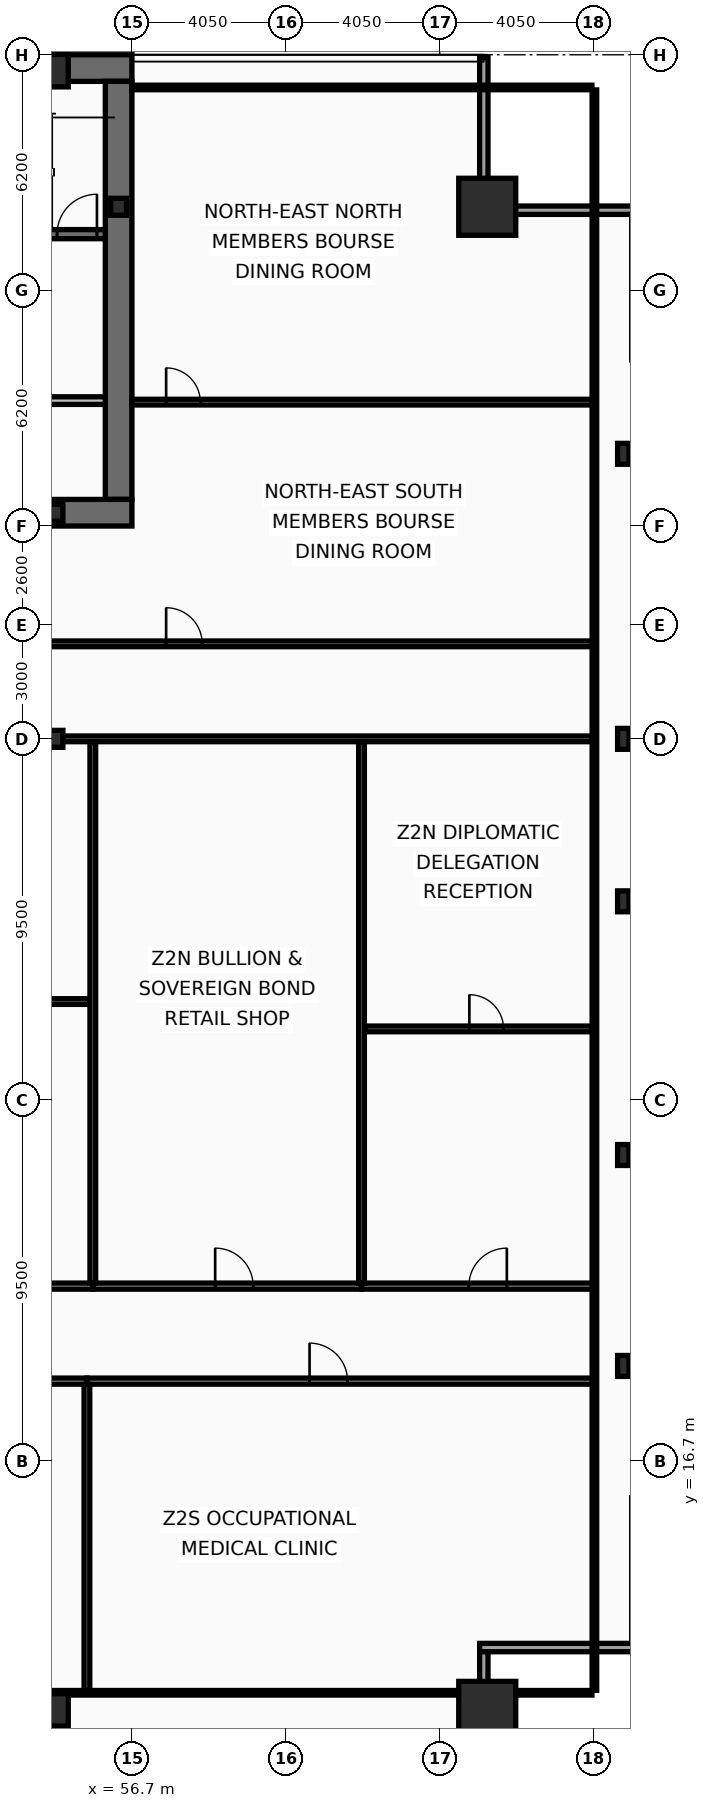
"""IFC4 building model, lengths in metres.
Left out: names, types, materials, properties, quantities, classifications, styles, units other than length and angle.
Written with IfcOpenShell. Run it as: python <this file> out.ifc"""

import sys

from ifc_helpers import new_model, si_unit, direction, frame, frame_2d, origin, origin_2d, place, context, subcontext, project, spatial, rectangle, hollow_rectangle, i_section, extrude, element, fill, save


model = new_model("IFC4")
c1 = context("Model", 3, precision=1e-05, world=origin(), true_north=direction((0.0, 1.0)))
c2 = subcontext(c1, "Body", "Model", "MODEL_VIEW")
j1 = project(units=[si_unit("LENGTHUNIT", "METRE"), si_unit("PLANEANGLEUNIT", "RADIAN")], contexts=[c1])
p1 = place(None, origin())
s1 = spatial("IfcSite", under=j1, at=p1, CompositionType="ELEMENT")
p2 = place(p1, origin())
s2 = spatial("IfcBuilding", under=s1, at=p2, CompositionType="ELEMENT")
p3 = place(p2, frame((0.0, 0.0, 114.6)))
s3 = spatial("IfcBuildingStorey", under=s2, at=p3, CompositionType="ELEMENT", Elevation=114.6)
p4 = place(p3, frame((16.2, 53.35, 0.0), z_axis=(0.0, 0.0, 1.0), x_axis=(1.0, 0.0, 0.0)))
e1 = element("IfcWall", 1, at=p4, inside=s3, PredefinedType="SHEAR", context=c2, shape_type="SweptSolid", body=[
    extrude(rectangle(XDim=40.5, YDim=0.7, at=frame_2d((20.25, 0.0))), origin(), (0.0, 0.0, 1.0), 3.44),
])
p5 = place(p3, frame((56.35, 53.0, 0.0), z_axis=(0.0, 0.0, 1.0), x_axis=(0.0, -1.0, 0.0)))
e2 = element("IfcWall", 2, at=p5, inside=s3, PredefinedType="SHEAR", context=c2, shape_type="SweptSolid", body=[
    extrude(rectangle(XDim=11.0, YDim=0.7, at=frame_2d((5.5, 0.0))), origin(), (0.0, 0.0, 1.0), 3.44),
])
p6 = place(p3, frame((56.7, 41.65, 0.0), z_axis=(0.0, 0.0, 1.0), x_axis=(-1.0, 0.0, 0.0)))
e3 = element("IfcWall", 3, at=p6, inside=s3, PredefinedType="SHEAR", context=c2, shape_type="SweptSolid", body=[
    extrude(rectangle(XDim=2.45, YDim=0.7, at=frame_2d((1.225, 0.0))), origin(), (0.0, 0.0, 1.0), 3.44),
])
p7 = place(p3, frame((48.63, 48.98, 0.0), z_axis=(0.0, 0.0, 1.0), x_axis=(1.0, 0.0, 0.0)))
e4 = element("IfcWall", 4, at=p7, inside=s3, PredefinedType="SHEAR", context=c2, shape_type="SweptSolid", body=[
    extrude(rectangle(XDim=7.37, YDim=0.24, at=frame_2d((3.685, 0.0))), origin(), (0.0, 0.0, 1.0), 3.44),
])
p8 = place(p7, frame((6.1, 0.0, 0.0)))
e5 = element("IfcOpeningElement", 5, at=p8, cuts=e4, PredefinedType="OPENING", context=c2, shape_type="SweptSolid", body=[
    extrude(rectangle(XDim=1.05, YDim=2.15, at=frame_2d((0.525, 1.075))), frame((0.0, 0.13, 0.0), z_axis=(0.0, -1.0, 0.0), x_axis=(1.0, 0.0, 0.0)), (0.0, 0.0, 1.0), 0.26),
])
for number, where, z_axis, x_axis in (
    (6, (66.05, 10.15, 0.0), (0.0, 0.0, 1.0), (1.0, 0.0, 0.0)),
    (7, (66.05, 49.7, 0.0), (0.0, 0.0, 1.0), (1.0, 0.0, 0.0)),
):
    element("IfcColumn", number, at=place(p3, frame(where, z_axis=z_axis, x_axis=x_axis)), inside=s3, PredefinedType="COLUMN", context=c2, shape_type="SweptSolid", body=[
        extrude(hollow_rectangle(XDim=1.5, YDim=1.5, WallThickness=0.07, at=origin_2d()), origin(), (0.0, 0.0, 1.0), 3.6),
    ])
for number, where, z_axis, x_axis in (
    (8, (54.675, 10.15, 0.0), (0.0, 0.0, 1.0), (1.0, 0.0, 0.0)),
    (9, (54.675, 53.28, 0.0), (0.0, 0.0, 1.0), (1.0, 0.0, 0.0)),
):
    element("IfcColumn", number, at=place(p3, frame(where, z_axis=z_axis, x_axis=x_axis)), inside=s3, PredefinedType="COLUMN", context=c2, shape_type="SweptSolid", body=[
        extrude(hollow_rectangle(XDim=0.7, YDim=0.85, WallThickness=0.05, at=origin_2d()), origin(), (0.0, 0.0, 1.0), 3.6),
    ])
for number, where, z_axis, x_axis in (
    (10, (69.63, 19.2, 0.0), (0.0, 0.0, 1.0), (1.0, 0.0, 0.0)),
    (11, (69.63, 24.75, 0.0), (0.0, 0.0, 1.0), (1.0, 0.0, 0.0)),
    (12, (69.63, 31.425, 0.0), (0.0, 0.0, 1.0), (1.0, 0.0, 0.0)),
    (13, (69.63, 35.7, 0.0), (0.0, 0.0, 1.0), (1.0, 0.0, 0.0)),
    (14, (69.63, 43.2, 0.0), (0.0, 0.0, 1.0), (1.0, 0.0, 0.0)),
):
    element("IfcColumn", number, at=place(p3, frame(where, z_axis=z_axis, x_axis=x_axis)), inside=s3, PredefinedType="COLUMN", context=c2, shape_type="SweptSolid", body=[
        extrude(i_section(OverallWidth=0.3, OverallDepth=0.55, WebThickness=0.015, FlangeThickness=0.029, at=origin_2d()), origin(), (0.0, 0.0, 1.0), 3.6),
    ])
for number, where, z_axis, x_axis in (
    (15, (56.35, 49.7, 0.0), (0.0, 0.0, 1.0), (1.0, 0.0, 0.0)),
    (16, (54.675, 35.7, 0.0), (0.0, 0.0, 1.0), (1.0, 0.0, 0.0)),
    (17, (54.675, 41.65, 0.0), (0.0, 0.0, 1.0), (1.0, 0.0, 0.0)),
):
    element("IfcColumn", number, at=place(p3, frame(where, z_axis=z_axis, x_axis=x_axis)), inside=s3, PredefinedType="COLUMN", context=c2, shape_type="SweptSolid", body=[
        extrude(i_section(OverallWidth=0.416, OverallDepth=0.446, WebThickness=0.039, FlangeThickness=0.063, at=origin_2d()), origin(), (0.0, 0.0, 1.0), 3.6),
    ])
p9 = place(p3, frame((65.96, 53.63, 0.0), z_axis=(0.0, 0.0, 1.0), x_axis=(0.0, -1.0, 0.0)))
e18 = element("IfcWall", 18, at=p9, inside=s3, PredefinedType="SOLIDWALL", context=c2, shape_type="SweptSolid", body=[
    extrude(rectangle(XDim=3.91, YDim=0.22, at=frame_2d((1.955, 0.0))), origin(), (0.0, 0.0, 1.0), 2.83),
])
for number, where, z_axis, x_axis in (
    (19, (65.85, 49.61, 0.0), (0.0, 0.0, 1.0), (1.0, 0.0, 0.0)),
    (20, (70.07, 11.79, 0.0), (0.0, 0.0, 1.0), (-1.0, 0.0, 0.0)),
):
    element("IfcWall", number, at=place(p3, frame(where, z_axis=z_axis, x_axis=x_axis)), inside=s3, PredefinedType="SOLIDWALL", context=c2, shape_type="SweptSolid", body=[
        extrude(rectangle(XDim=4.22, YDim=0.22, at=frame_2d((2.11, 0.0))), origin(), (0.0, 0.0, 1.0), 2.83),
    ])
p10 = place(p3, frame((65.96, 11.68, 0.0), z_axis=(0.0, 0.0, 1.0), x_axis=(0.0, -1.0, 0.0)))
e21 = element("IfcWall", 21, at=p10, inside=s3, PredefinedType="SOLIDWALL", context=c2, shape_type="SweptSolid", body=[
    extrude(rectangle(XDim=3.91, YDim=0.22, at=frame_2d((1.955, 0.0))), origin(), (0.0, 0.0, 1.0), 2.83),
])
p11 = place(p3, frame((51.9, 44.6, 0.0), z_axis=(0.0, 0.0, 1.0), x_axis=(1.0, 0.0, 0.0)))
e22 = element("IfcWall", 22, at=p11, inside=s3, PredefinedType="PARTITIONING", context=c2, shape_type="SweptSolid", body=[
    extrude(rectangle(XDim=4.1, YDim=0.2, at=frame_2d((2.05, 0.0))), origin(), (0.0, 0.0, 1.0), 3.44),
])
p12 = place(p11, frame((1.15, 0.0, 0.0)))
e23 = element("IfcOpeningElement", 23, at=p12, cuts=e22, PredefinedType="OPENING", context=c2, shape_type="SweptSolid", body=[
    extrude(rectangle(XDim=1.05, YDim=2.15, at=frame_2d((0.525, 1.075))), frame((0.0, 0.11, 0.0), z_axis=(0.0, -1.0, 0.0), x_axis=(1.0, 0.0, 0.0)), (0.0, 0.0, 1.0), 0.22),
])
p13 = place(p3, frame((54.35, 38.2, 0.0), z_axis=(0.0, 0.0, 1.0), x_axis=(1.0, 0.0, 0.0)))
e24 = element("IfcWall", 24, at=p13, inside=s3, PredefinedType="PARTITIONING", context=c2, shape_type="SweptSolid", body=[
    extrude(rectangle(XDim=14.52, YDim=0.15, at=frame_2d((7.26, 0.0))), origin(), (0.0, 0.0, 1.0), 2.73),
])
p14 = place(p13, frame((3.25, 0.0, 0.0)))
e25 = element("IfcOpeningElement", 25, at=p14, cuts=e24, PredefinedType="OPENING", context=c2, shape_type="SweptSolid", body=[
    extrude(rectangle(XDim=0.95, YDim=2.05, at=frame_2d((0.475, 1.025))), frame((0.0, 0.085, 0.0), z_axis=(0.0, -1.0, 0.0), x_axis=(1.0, 0.0, 0.0)), (0.0, 0.0, 1.0), 0.17),
])
p15 = place(p3, frame((56.7, 44.56, 0.0), z_axis=(0.0, 0.0, 1.0), x_axis=(1.0, 0.0, 0.0)))
e26 = element("IfcWall", 26, at=p15, inside=s3, PredefinedType="PARTITIONING", context=c2, shape_type="SweptSolid", body=[
    extrude(rectangle(XDim=12.105, YDim=0.15, at=frame_2d((6.052, 0.0))), origin(), (0.0, 0.0, 1.0), 2.83),
])
p16 = place(p15, frame((0.9, 0.0, 0.0)))
e27 = element("IfcOpeningElement", 27, at=p16, cuts=e26, PredefinedType="OPENING", context=c2, shape_type="SweptSolid", body=[
    extrude(rectangle(XDim=0.9, YDim=2.05, at=frame_2d((0.45, 1.025))), frame((0.0, 0.085, 0.0), z_axis=(0.0, -1.0, 0.0), x_axis=(1.0, 0.0, 0.0)), (0.0, 0.0, 1.0), 0.17),
])
p17 = place(p3, frame((42.136, 18.8, 0.0), z_axis=(0.0, 0.0, 1.0), x_axis=(1.0, 0.0, 0.0)))
e28 = element("IfcWall", 28, at=p17, inside=s3, PredefinedType="PARTITIONING", context=c2, shape_type="SweptSolid", body=[
    extrude(rectangle(XDim=13.38, YDim=0.16, at=frame_2d((6.69, 0.0))), origin(), (0.0, 0.0, 1.0), 2.73),
])
p18 = place(p17, frame((5.87, 0.0, 0.0)))
e29 = element("IfcOpeningElement", 29, at=p18, cuts=e28, PredefinedType="OPENING", context=c2, shape_type="SweptSolid", body=[
    extrude(rectangle(XDim=1.0, YDim=2.05, at=frame_2d((0.5, 1.025))), frame((0.0, 0.09, 0.0), z_axis=(0.0, -1.0, 0.0), x_axis=(1.0, 0.0, 0.0)), (0.0, 0.0, 1.0), 0.18),
])
p19 = place(p3, frame((55.516, 18.8, 0.0), z_axis=(0.0, 0.0, 1.0), x_axis=(1.0, 0.0, 0.0)))
e30 = element("IfcWall", 30, at=p19, inside=s3, PredefinedType="PARTITIONING", context=c2, shape_type="SweptSolid", body=[
    extrude(rectangle(XDim=13.354, YDim=0.16, at=frame_2d((6.677, 0.0))), origin(), (0.0, 0.0, 1.0), 2.73),
])
p20 = place(p19, frame((5.859, 0.0, 0.0)))
e31 = element("IfcOpeningElement", 31, at=p20, cuts=e30, PredefinedType="OPENING", context=c2, shape_type="SweptSolid", body=[
    extrude(rectangle(XDim=1.0, YDim=2.05, at=frame_2d((0.5, 1.025))), frame((0.0, 0.09, 0.0), z_axis=(0.0, -1.0, 0.0), x_axis=(1.0, 0.0, 0.0)), (0.0, 0.0, 1.0), 0.18),
])
p21 = place(p3, frame((55.516, 10.665, 0.0), z_axis=(0.0, 0.0, 1.0), x_axis=(0.0, 1.0, 0.0)))
e32 = element("IfcWall", 32, at=p21, inside=s3, PredefinedType="PARTITIONING", context=c2, shape_type="SweptSolid", body=[
    extrude(rectangle(XDim=8.05, YDim=0.15, at=frame_2d((4.025, 0.0))), origin(), (0.0, 0.0, 1.0), 3.44),
])
p22 = place(p3, frame((21.81, 35.7, 0.0), z_axis=(0.0, 0.0, 1.0), x_axis=(1.0, 0.0, 0.0)))
e33 = element("IfcWall", 33, at=p22, inside=s3, PredefinedType="PARTITIONING", context=c2, shape_type="SweptSolid", body=[
    extrude(rectangle(XDim=46.995, YDim=0.15, at=frame_2d((23.498, 0.0))), origin(), (0.0, 0.0, 1.0), 2.73),
])
p23 = place(p3, frame((49.071, 21.3, 0.0), z_axis=(0.0, 0.0, 1.0), x_axis=(1.0, 0.0, 0.0)))
e34 = element("IfcWall", 34, at=p23, inside=s3, PredefinedType="PARTITIONING", context=c2, shape_type="SweptSolid", body=[
    extrude(rectangle(XDim=6.6, YDim=0.16, at=frame_2d((3.3, 0.0))), origin(), (0.0, 0.0, 1.0), 2.73),
])
p24 = place(p23, frame((3.022, 0.0, 0.0)))
e35 = element("IfcOpeningElement", 35, at=p24, cuts=e34, PredefinedType="OPENING", context=c2, shape_type="SweptSolid", body=[
    extrude(rectangle(XDim=1.0, YDim=2.05, at=frame_2d((0.5, 1.025))), frame((0.0, 0.09, 0.0), z_axis=(0.0, -1.0, 0.0), x_axis=(1.0, 0.0, 0.0)), (0.0, 0.0, 1.0), 0.18),
])
p25 = place(p3, frame((49.151, 28.788, 0.0), z_axis=(0.0, 0.0, 1.0), x_axis=(1.0, 0.0, 0.0)))
e36 = element("IfcWall", 36, at=p25, inside=s3, PredefinedType="PARTITIONING", context=c2, shape_type="SweptSolid", body=[
    extrude(rectangle(XDim=6.44, YDim=0.15, at=frame_2d((3.22, 0.0))), origin(), (0.0, 0.0, 1.0), 2.73),
])
p26 = place(p25, frame((2.97, 0.0, 0.0)))
e37 = element("IfcOpeningElement", 37, at=p26, cuts=e36, PredefinedType="OPENING", context=c2, shape_type="SweptSolid", body=[
    extrude(rectangle(XDim=0.9, YDim=2.05, at=frame_2d((0.45, 1.025))), frame((0.0, 0.085, 0.0), z_axis=(0.0, -1.0, 0.0), x_axis=(1.0, 0.0, 0.0)), (0.0, 0.0, 1.0), 0.17),
])
p27 = place(p3, frame((55.671, 21.3, 0.0), z_axis=(0.0, 0.0, 1.0), x_axis=(1.0, 0.0, 0.0)))
e38 = element("IfcWall", 38, at=p27, inside=s3, PredefinedType="PARTITIONING", context=c2, shape_type="SweptSolid", body=[
    extrude(rectangle(XDim=7.071, YDim=0.16, at=frame_2d((3.535, 0.0))), origin(), (0.0, 0.0, 1.0), 3.44),
])
p28 = place(p27, frame((3.22, 0.0, 0.0)))
e39 = element("IfcOpeningElement", 39, at=p28, cuts=e38, PredefinedType="OPENING", context=c2, shape_type="SweptSolid", body=[
    extrude(rectangle(XDim=1.0, YDim=2.05, at=frame_2d((0.5, 1.025))), frame((0.0, 0.09, 0.0), z_axis=(0.0, -1.0, 0.0), x_axis=(1.0, 0.0, 0.0)), (0.0, 0.0, 1.0), 0.18),
])
p29 = place(p3, frame((55.671, 21.385, 0.0), z_axis=(0.0, 0.0, 1.0), x_axis=(0.0, 1.0, 0.0)))
e40 = element("IfcWall", 40, at=p29, inside=s3, PredefinedType="PARTITIONING", context=c2, shape_type="SweptSolid", body=[
    extrude(rectangle(XDim=14.235, YDim=0.15, at=frame_2d((7.118, 0.0))), origin(), (0.0, 0.0, 1.0), 2.73),
])
p30 = place(p3, frame((62.742, 21.3, 0.0), z_axis=(0.0, 0.0, 1.0), x_axis=(1.0, 0.0, 0.0)))
e41 = element("IfcWall", 41, at=p30, inside=s3, PredefinedType="PARTITIONING", context=c2, shape_type="SweptSolid", body=[
    extrude(rectangle(XDim=6.128, YDim=0.16, at=frame_2d((3.064, 0.0))), origin(), (0.0, 0.0, 1.0), 3.44),
])
p31 = place(p30, frame((2.824, 0.0, 0.0)))
e42 = element("IfcOpeningElement", 42, at=p31, cuts=e41, PredefinedType="OPENING", context=c2, shape_type="SweptSolid", body=[
    extrude(rectangle(XDim=1.0, YDim=2.05, at=frame_2d((0.5, 1.025))), frame((0.0, 0.09, 0.0), z_axis=(0.0, -1.0, 0.0), x_axis=(1.0, 0.0, 0.0)), (0.0, 0.0, 1.0), 0.18),
])
p32 = place(p3, frame((62.742, 21.385, 0.0), z_axis=(0.0, 0.0, 1.0), x_axis=(0.0, 1.0, 0.0)))
e43 = element("IfcWall", 43, at=p32, inside=s3, PredefinedType="PARTITIONING", context=c2, shape_type="SweptSolid", body=[
    extrude(rectangle(XDim=14.235, YDim=0.15, at=frame_2d((7.118, 0.0))), origin(), (0.0, 0.0, 1.0), 2.73),
])
p33 = place(p3, frame((62.822, 28.068, 0.0), z_axis=(0.0, 0.0, 1.0), x_axis=(1.0, 0.0, 0.0)))
e44 = element("IfcWall", 44, at=p33, inside=s3, PredefinedType="PARTITIONING", context=c2, shape_type="SweptSolid", body=[
    extrude(rectangle(XDim=5.983, YDim=0.15, at=frame_2d((2.992, 0.0))), origin(), (0.0, 0.0, 1.0), 3.44),
])
p34 = place(p33, frame((2.758, 0.0, 0.0)))
e45 = element("IfcOpeningElement", 45, at=p34, cuts=e44, PredefinedType="OPENING", context=c2, shape_type="SweptSolid", body=[
    extrude(rectangle(XDim=0.9, YDim=2.05, at=frame_2d((0.45, 1.025))), frame((0.0, 0.085, 0.0), z_axis=(0.0, -1.0, 0.0), x_axis=(1.0, 0.0, 0.0)), (0.0, 0.0, 1.0), 0.17),
])
p35 = place(p3, frame((68.87, 10.665, 0.0), z_axis=(0.0, 0.0, 1.0), x_axis=(0.0, 1.0, 0.0)))
e46 = element("IfcWall", 46, at=p35, inside=s3, PredefinedType="PARTITIONING", context=c2, shape_type="SweptSolid", body=[
    extrude(rectangle(XDim=42.11, YDim=0.12, at=frame_2d((21.055, 0.0))), origin(), (0.0, 0.0, 1.0), 2.73),
])
p36 = place(p3, frame((56.7, 52.84, 0.0), z_axis=(0.0, 0.0, 1.0), x_axis=(1.0, 0.0, 0.0)))
e47 = element("IfcWall", 47, at=p36, inside=s3, PredefinedType="PARTITIONING", context=c2, shape_type="SweptSolid", body=[
    extrude(rectangle(XDim=12.105, YDim=0.12, at=frame_2d((6.052, 0.0))), origin(), (0.0, 0.0, 1.0), 3.44),
])
p37 = place(p3, frame((4.095, 10.6, 0.0), z_axis=(0.0, 0.0, 1.0), x_axis=(1.0, 0.0, 0.0)))
e48 = element("IfcWall", 48, at=p37, inside=s3, PredefinedType="PARTITIONING", context=c2, shape_type="SweptSolid", body=[
    extrude(rectangle(XDim=64.71, YDim=0.12, at=frame_2d((32.355, 0.0))), origin(), (0.0, 0.0, 1.0), 2.73),
])
p38 = place(p8, origin())
e49 = element("IfcDoor", 49, at=p38, inside=s3, OperationType="SINGLE_SWING_RIGHT", PredefinedType="DOOR", context=c2, shape_type="SweptSolid", body=[
    extrude(rectangle(XDim=1.05, YDim=2.15, at=frame_2d((0.525, 1.075))), frame((0.0, 0.025, 0.0), z_axis=(0.0, -1.0, 0.0), x_axis=(1.0, 0.0, 0.0)), (0.0, 0.0, 1.0), 0.05),
])
fill(e5, e49)
p39 = place(p14, origin())
e50 = element("IfcDoor", 50, at=p39, inside=s3, OperationType="SINGLE_SWING_LEFT", PredefinedType="DOOR", context=c2, shape_type="SweptSolid", body=[
    extrude(rectangle(XDim=0.95, YDim=2.05, at=frame_2d((0.475, 1.025))), frame((0.0, 0.025, 0.0), z_axis=(0.0, -1.0, 0.0), x_axis=(1.0, 0.0, 0.0)), (0.0, 0.0, 1.0), 0.05),
])
fill(e25, e50)
p40 = place(p16, origin())
e51 = element("IfcDoor", 51, at=p40, inside=s3, OperationType="SINGLE_SWING_LEFT", PredefinedType="DOOR", context=c2, shape_type="SweptSolid", body=[
    extrude(rectangle(XDim=0.9, YDim=2.05, at=frame_2d((0.45, 1.025))), frame((0.0, 0.025, 0.0), z_axis=(0.0, -1.0, 0.0), x_axis=(1.0, 0.0, 0.0)), (0.0, 0.0, 1.0), 0.05),
])
fill(e27, e51)
p41 = place(p20, origin())
e52 = element("IfcDoor", 52, at=p41, inside=s3, OperationType="SINGLE_SWING_LEFT", PredefinedType="DOOR", context=c2, shape_type="SweptSolid", body=[
    extrude(rectangle(XDim=1.0, YDim=2.05, at=frame_2d((0.5, 1.025))), frame((0.0, 0.025, 0.0), z_axis=(0.0, -1.0, 0.0), x_axis=(1.0, 0.0, 0.0)), (0.0, 0.0, 1.0), 0.05),
])
fill(e31, e52)
p42 = place(p28, origin())
e53 = element("IfcDoor", 53, at=p42, inside=s3, OperationType="SINGLE_SWING_LEFT", PredefinedType="DOOR", context=c2, shape_type="SweptSolid", body=[
    extrude(rectangle(XDim=1.0, YDim=2.05, at=frame_2d((0.5, 1.025))), frame((0.0, 0.025, 0.0), z_axis=(0.0, -1.0, 0.0), x_axis=(1.0, 0.0, 0.0)), (0.0, 0.0, 1.0), 0.05),
])
fill(e39, e53)
p43 = place(p31, origin())
e54 = element("IfcDoor", 54, at=p43, inside=s3, OperationType="SINGLE_SWING_RIGHT", PredefinedType="DOOR", context=c2, shape_type="SweptSolid", body=[
    extrude(rectangle(XDim=1.0, YDim=2.05, at=frame_2d((0.5, 1.025))), frame((0.0, 0.025, 0.0), z_axis=(0.0, -1.0, 0.0), x_axis=(1.0, 0.0, 0.0)), (0.0, 0.0, 1.0), 0.05),
])
fill(e42, e54)
p44 = place(p34, origin())
e55 = element("IfcDoor", 55, at=p44, inside=s3, OperationType="SINGLE_SWING_LEFT", PredefinedType="DOOR", context=c2, shape_type="SweptSolid", body=[
    extrude(rectangle(XDim=0.9, YDim=2.05, at=frame_2d((0.45, 1.025))), frame((0.0, 0.025, 0.0), z_axis=(0.0, -1.0, 0.0), x_axis=(1.0, 0.0, 0.0)), (0.0, 0.0, 1.0), 0.05),
])
fill(e45, e55)
save(model, sys.argv[1])
